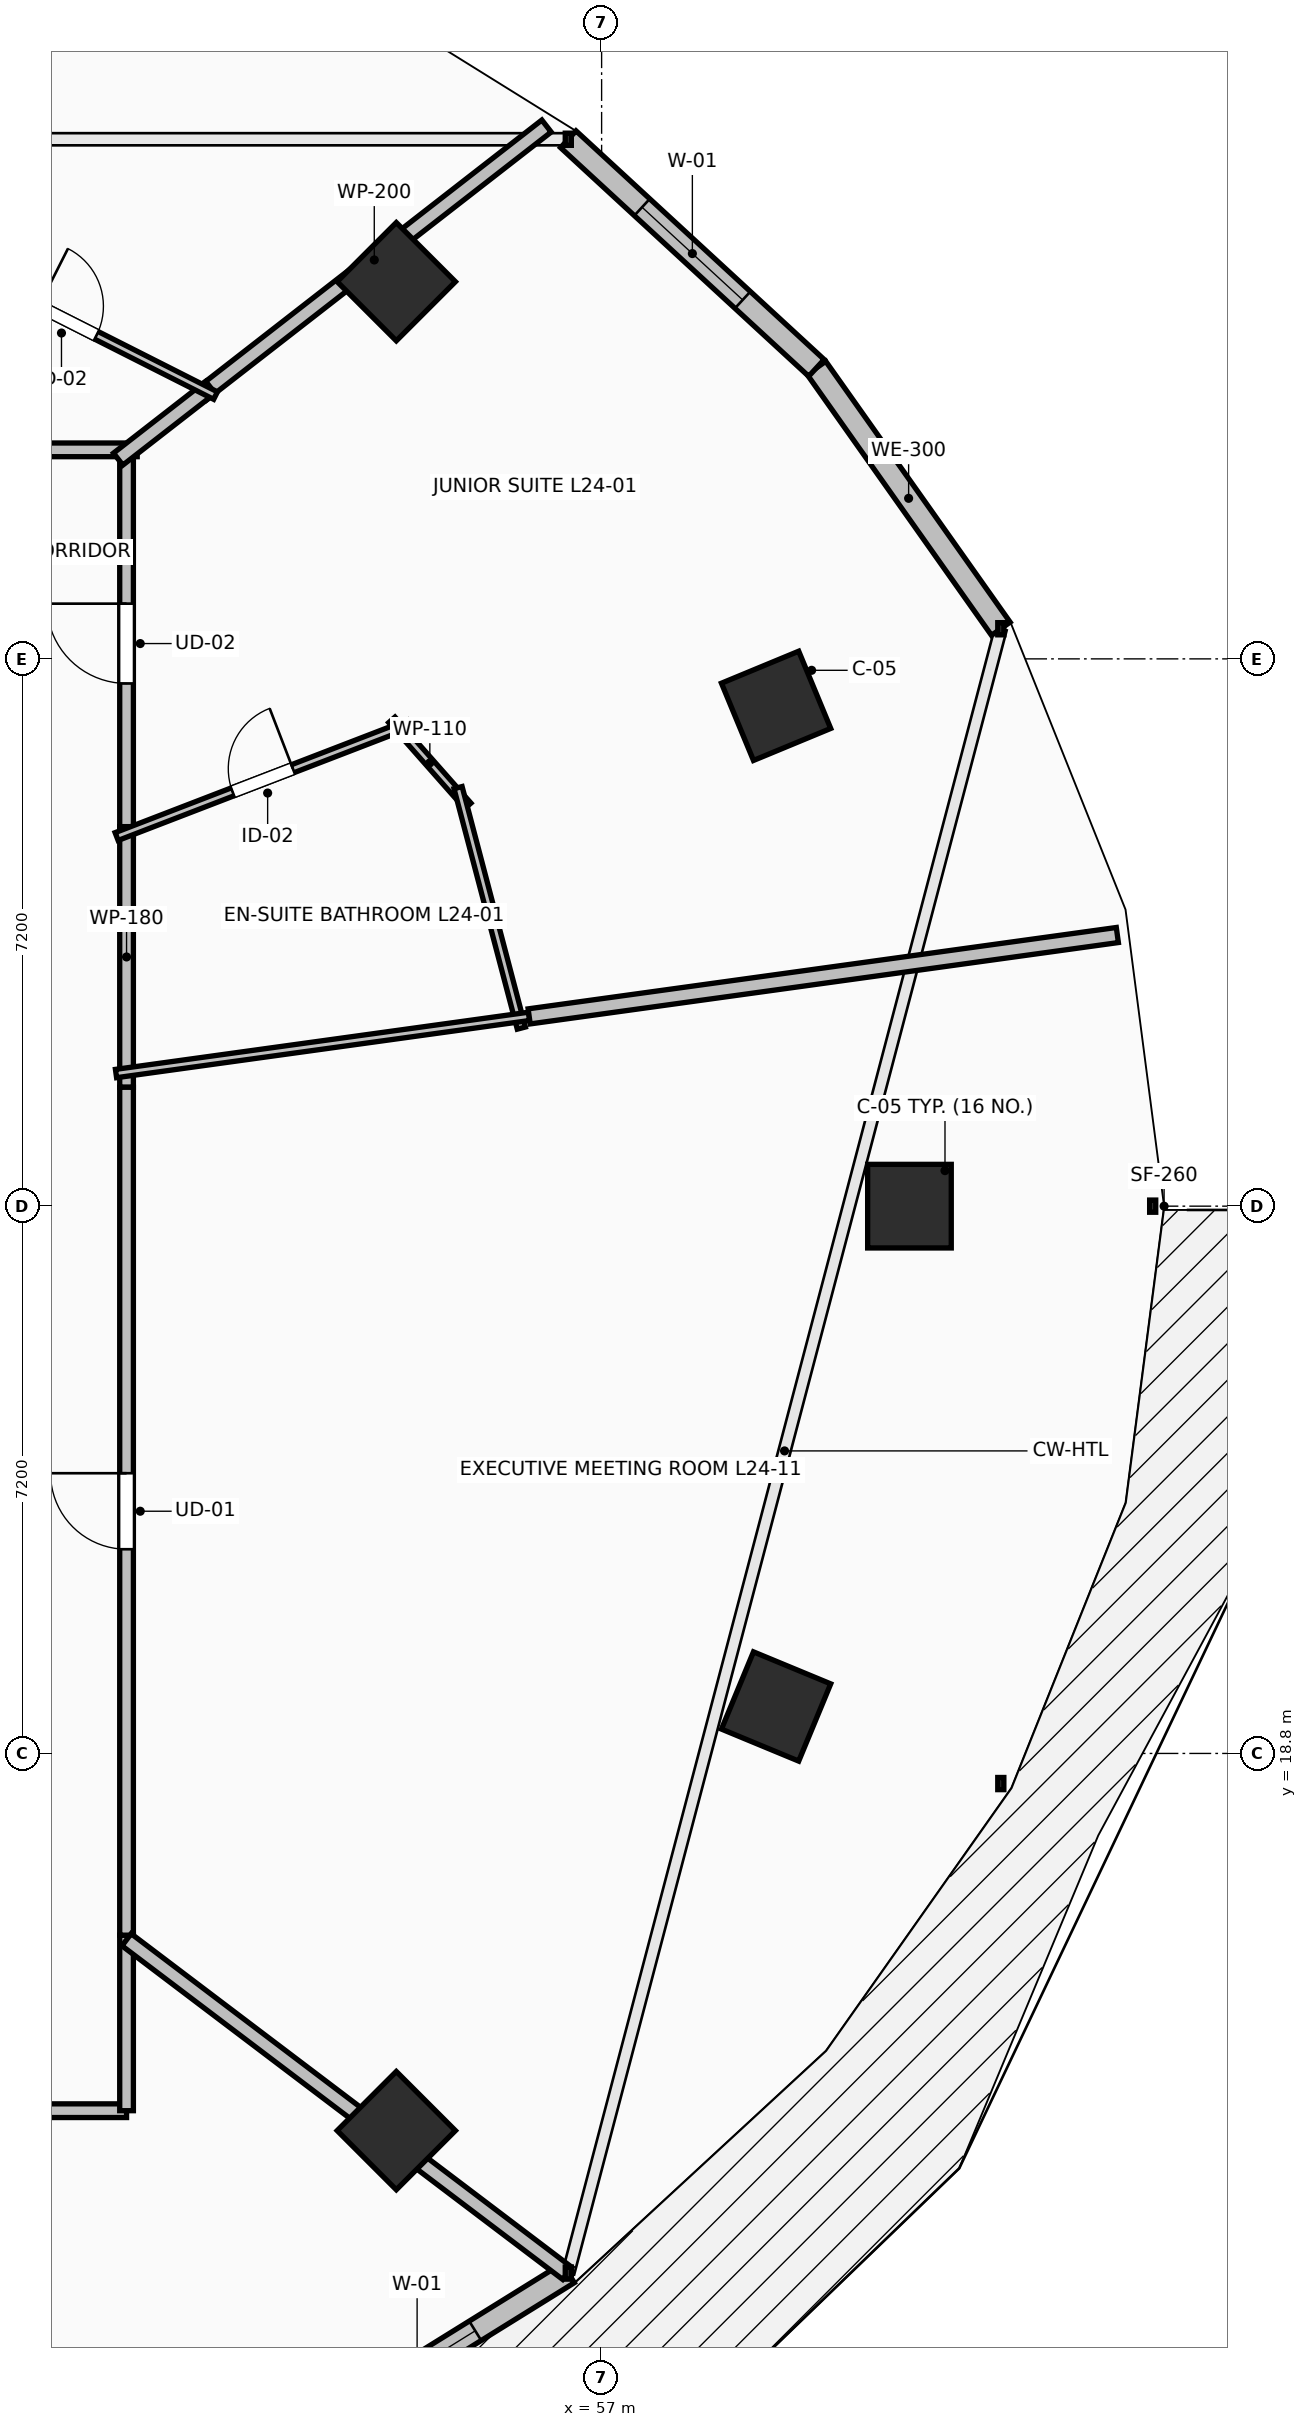
"""IFC4 building model, lengths in metres.
Left out: names, types, materials, properties, quantities, classifications, styles, units other than length and angle.
Written with IfcOpenShell. Run it as: python <this file> out.ifc"""

import sys

from ifc_helpers import new_model, si_unit, direction, frame, frame_2d, origin, origin_2d, place, context, subcontext, project, spatial, rectangle, extrude, element, fill, save


model = new_model("IFC4")
c1 = context("Model", 3, precision=1e-05, world=origin(), true_north=direction((0.0, 1.0)))
c2 = subcontext(c1, "Body", "Model", "MODEL_VIEW")
j1 = project(units=[si_unit("LENGTHUNIT", "METRE"), si_unit("PLANEANGLEUNIT", "RADIAN")], contexts=[c1])
p1 = place(None, origin())
s1 = spatial("IfcSite", under=j1, at=p1, CompositionType="ELEMENT")
p2 = place(p1, origin())
s2 = spatial("IfcBuilding", under=s1, at=p2, CompositionType="ELEMENT")
p3 = place(p2, frame((0.0, 0.0, 92.8)))
s3 = spatial("IfcBuildingStorey", under=s2, at=p3, CompositionType="ELEMENT", Elevation=92.8)
for number, where, z_axis, x_axis in (
    (1, (61.05, 26.0, 0.0), (0.0, 0.0, 1.0), (1.0, 0.0, 0.0)),
    (2, (59.295, 32.582, 0.0), (0.0, 0.0, 1.0), (0.924, 0.383, 0.0)),
    (3, (54.299, 38.162, 0.0), (0.0, 0.0, 1.0), (0.707, 0.707, 0.0)),
    (4, (54.299, 13.838, 0.0), (0.0, 0.0, 1.0), (0.707, -0.707, 0.0)),
    (5, (59.295, 19.418, 0.0), (0.0, 0.0, 1.0), (0.924, -0.383, 0.0)),
):
    element("IfcColumn", number, at=place(p3, frame(where, z_axis=z_axis, x_axis=x_axis)), inside=s3, PredefinedType="COLUMN", context=c2, shape_type="SweptSolid", body=[
        extrude(rectangle(XDim=1.1, YDim=1.1, at=origin_2d()), origin(), (0.0, 0.0, 1.0), 3.5),
    ])
p4 = place(p3, frame((62.252, 33.596, 0.0), z_axis=(0.0, 0.0, 1.0), x_axis=(-0.57716435238, 0.81662801222, 0.0)))
e6 = element("IfcWall", 6, at=p4, inside=s3, PredefinedType="STANDARD", context=c2, shape_type="SweptSolid", body=[
    extrude(rectangle(XDim=4.202, YDim=0.3, at=frame_2d((2.101, 0.0))), origin(), (0.0, 0.0, 1.0), 3.24),
])
p5 = place(p3, frame((59.826, 37.028, 0.0), z_axis=(0.0, 0.0, 1.0), x_axis=(-0.735416718093, 0.677615119924, 0.0)))
e7 = element("IfcWall", 7, at=p5, inside=s3, PredefinedType="STANDARD", context=c2, shape_type="SweptSolid", body=[
    extrude(rectangle(XDim=4.439, YDim=0.3, at=frame_2d((2.22, 0.0))), origin(), (0.0, 0.0, 1.0), 3.24),
])
p6 = place(p5, frame((1.32, 0.0, 0.85)))
e8 = element("IfcOpeningElement", 8, at=p6, cuts=e7, PredefinedType="OPENING", context=c2, shape_type="SweptSolid", body=[
    extrude(rectangle(XDim=1.8, YDim=2.19, at=frame_2d((0.9, 1.095))), frame((0.0, 0.165, 0.0), z_axis=(0.0, -1.0, 0.0), x_axis=(1.0, 0.0, 0.0)), (0.0, 0.0, 1.0), 0.33),
])
p7 = place(p3, frame((52.584, 9.495, 0.0), z_axis=(0.0, 0.0, 1.0), x_axis=(0.849684479743, 0.527291461038, 0.0)))
e9 = element("IfcWall", 9, at=p7, inside=s3, PredefinedType="STANDARD", context=c2, shape_type="SweptSolid", body=[
    extrude(rectangle(XDim=4.681, YDim=0.3, at=frame_2d((2.341, 0.0))), origin(), (0.0, 0.0, 1.0), 3.24),
])
p8 = place(p7, frame((1.441, 0.0, 0.85)))
e10 = element("IfcOpeningElement", 10, at=p8, cuts=e9, PredefinedType="OPENING", context=c2, shape_type="SweptSolid", body=[
    extrude(rectangle(XDim=1.8, YDim=2.19, at=frame_2d((0.9, 1.095))), frame((0.0, 0.165, 0.0), z_axis=(0.0, -1.0, 0.0), x_axis=(1.0, 0.0, 0.0)), (0.0, 0.0, 1.0), 0.33),
])
p9 = place(p3, frame((50.75, 30.853, 0.0), z_axis=(0.0, 0.0, 1.0), x_axis=(0.0, 1.0, 0.0)))
e11 = element("IfcWall", 11, at=p9, inside=s3, PredefinedType="PARTITIONING", context=c2, shape_type="SweptSolid", body=[
    extrude(rectangle(XDim=5.097, YDim=0.18, at=frame_2d((2.548, 0.0))), origin(), (0.0, 0.0, 1.0), 2.432),
])
p10 = place(p9, frame((2.023, 0.0, 0.0)))
e12 = element("IfcOpeningElement", 12, at=p10, cuts=e11, PredefinedType="OPENING", context=c2, shape_type="SweptSolid", body=[
    extrude(rectangle(XDim=1.05, YDim=2.2, at=frame_2d((0.525, 1.1))), frame((0.0, 0.105, 0.0), z_axis=(0.0, -1.0, 0.0), x_axis=(1.0, 0.0, 0.0)), (0.0, 0.0, 1.0), 0.21),
])
p11 = place(p3, frame((50.75, 27.564, 0.0), z_axis=(0.0, 0.0, 1.0), x_axis=(0.0, 1.0, 0.0)))
e13 = element("IfcWall", 13, at=p11, inside=s3, PredefinedType="PARTITIONING", context=c2, shape_type="SweptSolid", body=[
    extrude(rectangle(XDim=3.429, YDim=0.18, at=frame_2d((1.714, 0.0))), origin(), (0.0, 0.0, 1.0), 2.432),
])
p12 = place(p3, frame((50.89, 35.95, 0.0), z_axis=(0.0, 0.0, 1.0), x_axis=(-1.0, 0.0, 0.0)))
e14 = element("IfcWall", 14, at=p12, inside=s3, PredefinedType="PARTITIONING", context=c2, shape_type="SweptSolid", body=[
    extrude(rectangle(XDim=4.914, YDim=0.18, at=frame_2d((2.457, 0.0))), origin(), (0.0, 0.0, 1.0), 2.432),
])
p13 = place(p3, frame((44.181, 14.1, 0.0), z_axis=(0.0, 0.0, 1.0), x_axis=(1.0, 0.0, 0.0)))
e15 = element("IfcWall", 15, at=p13, inside=s3, PredefinedType="PARTITIONING", context=c2, shape_type="SweptSolid", body=[
    extrude(rectangle(XDim=6.569, YDim=0.18, at=frame_2d((3.285, 0.0))), origin(), (0.0, 0.0, 1.0), 2.432),
])
p14 = place(p13, frame((2.76, 0.0, 0.0)))
e16 = element("IfcOpeningElement", 16, at=p14, cuts=e15, PredefinedType="OPENING", context=c2, shape_type="SweptSolid", body=[
    extrude(rectangle(XDim=1.05, YDim=2.2, at=frame_2d((0.525, 1.1))), frame((0.0, 0.105, 0.0), z_axis=(0.0, -1.0, 0.0), x_axis=(1.0, 0.0, 0.0)), (0.0, 0.0, 1.0), 0.21),
])
p15 = place(p3, frame((50.75, 14.1, 0.0), z_axis=(0.0, 0.0, 1.0), x_axis=(0.0, 1.0, 0.0)))
e17 = element("IfcWall", 17, at=p15, inside=s3, PredefinedType="PARTITIONING", context=c2, shape_type="SweptSolid", body=[
    extrude(rectangle(XDim=2.309, YDim=0.18, at=frame_2d((1.154, 0.0))), origin(), (0.0, 0.0, 1.0), 2.432),
])
p16 = place(p3, frame((50.75, 16.409, 0.0), z_axis=(0.0, 0.0, 1.0), x_axis=(0.0, 1.0, 0.0)))
e18 = element("IfcWall", 18, at=p16, inside=s3, PredefinedType="PARTITIONING", context=c2, shape_type="SweptSolid", body=[
    extrude(rectangle(XDim=11.155, YDim=0.18, at=frame_2d((5.578, 0.0))), origin(), (0.0, 0.0, 1.0), 2.432),
])
p17 = place(p16, frame((5.077, 0.0, 0.0)))
e19 = element("IfcOpeningElement", 19, at=p17, cuts=e18, PredefinedType="OPENING", context=c2, shape_type="SweptSolid", body=[
    extrude(rectangle(XDim=1.0, YDim=2.15, at=frame_2d((0.5, 1.075))), frame((0.0, 0.105, 0.0), z_axis=(0.0, -1.0, 0.0), x_axis=(1.0, 0.0, 0.0)), (0.0, 0.0, 1.0), 0.21),
])
p18 = place(p3, frame((54.24, 32.398, 0.0), z_axis=(0.0, 0.0, 1.0), x_axis=(0.661931735756, -0.749564124808, 0.0)))
e20 = element("IfcWall", 20, at=p18, inside=s3, PredefinedType="PARTITIONING", context=c2, shape_type="SweptSolid", body=[
    extrude(rectangle(XDim=1.51, YDim=0.11, at=frame_2d((0.755, 0.0))), origin(), (0.0, 0.0, 1.0), 3.24),
])
p19 = place(p3, frame((55.111, 31.506, 0.0), z_axis=(0.0, 0.0, 1.0), x_axis=(0.254405137241, -0.967097733502, 0.0)))
e21 = element("IfcWall", 21, at=p19, inside=s3, PredefinedType="PARTITIONING", context=c2, shape_type="SweptSolid", body=[
    extrude(rectangle(XDim=3.271, YDim=0.11, at=frame_2d((1.636, 0.0))), origin(), (0.0, 0.0, 1.0), 2.922),
])
p20 = place(p3, frame((56.047, 28.497, 0.0), z_axis=(0.0, 0.0, 1.0), x_axis=(-0.990553307294, -0.137128207927, 0.0)))
e22 = element("IfcWall", 22, at=p20, inside=s3, PredefinedType="PARTITIONING", context=c2, shape_type="SweptSolid", body=[
    extrude(rectangle(XDim=5.487, YDim=0.11, at=frame_2d((2.744, 0.0))), origin(), (0.0, 0.0, 1.0), 2.432),
])
p21 = place(p3, frame((50.619, 30.863, 0.0), z_axis=(0.0, 0.0, 1.0), x_axis=(0.933189718051, 0.359384126144, 0.0)))
e23 = element("IfcWall", 23, at=p21, inside=s3, PredefinedType="PARTITIONING", context=c2, shape_type="SweptSolid", body=[
    extrude(rectangle(XDim=4.119, YDim=0.11, at=frame_2d((2.06, 0.0))), origin(), (0.0, 0.0, 1.0), 2.972),
])
p22 = place(p21, frame((1.635, 0.0, 0.0)))
e24 = element("IfcOpeningElement", 24, at=p22, cuts=e23, PredefinedType="OPENING", context=c2, shape_type="SweptSolid", body=[
    extrude(rectangle(XDim=0.85, YDim=2.1, at=frame_2d((0.425, 1.05))), frame((0.0, 0.07, 0.0), z_axis=(0.0, -1.0, 0.0), x_axis=(1.0, 0.0, 0.0)), (0.0, 0.0, 1.0), 0.14),
])
p23 = place(p3, frame((56.275, 40.21, 0.0), z_axis=(0.0, 0.0, 1.0), x_axis=(-0.78943235806, -0.613837561614, 0.0)))
e25 = element("IfcWall", 25, at=p23, inside=s3, PredefinedType="PARTITIONING", context=c2, shape_type="SweptSolid", body=[
    extrude(rectangle(XDim=5.741, YDim=0.2, at=frame_2d((2.87, 0.0))), origin(), (0.0, 0.0, 1.0), 2.677),
])
p24 = place(p3, frame((51.854, 36.772, 0.0), z_axis=(0.0, 0.0, 1.0), x_axis=(-0.789420593357, -0.613852691436, 0.0)))
e26 = element("IfcWall", 26, at=p24, inside=s3, PredefinedType="PARTITIONING", context=c2, shape_type="SweptSolid", body=[
    extrude(rectangle(XDim=1.538, YDim=0.2, at=frame_2d((0.769, 0.0))), origin(), (0.0, 0.0, 1.0), 2.922),
])
p25 = place(p3, frame((56.047, 28.497, 0.0), z_axis=(0.0, 0.0, 1.0), x_axis=(0.990569127114, 0.137013883997, 0.0)))
e27 = element("IfcWall", 27, at=p25, inside=s3, PredefinedType="PARTITIONING", context=c2, shape_type="SweptSolid", body=[
    extrude(rectangle(XDim=7.812, YDim=0.2, at=frame_2d((3.906, 0.0))), origin(), (0.0, 0.0, 1.0), 2.677),
])
p26 = place(p3, frame((48.029, 38.631, 0.0), z_axis=(0.0, 0.0, 1.0), x_axis=(0.892459125519, -0.451128262558, 0.0)))
e28 = element("IfcWall", 28, at=p26, inside=s3, PredefinedType="PARTITIONING", context=c2, shape_type="SweptSolid", body=[
    extrude(rectangle(XDim=4.361, YDim=0.11, at=frame_2d((2.18, 0.0))), origin(), (0.0, 0.0, 1.0), 3.24),
])
p27 = place(p26, frame((1.755, 0.0, 0.0)))
e29 = element("IfcOpeningElement", 29, at=p27, cuts=e28, PredefinedType="OPENING", context=c2, shape_type="SweptSolid", body=[
    extrude(rectangle(XDim=0.85, YDim=2.1, at=frame_2d((0.425, 1.05))), frame((0.0, 0.07, 0.0), z_axis=(0.0, -1.0, 0.0), x_axis=(1.0, 0.0, 0.0)), (0.0, 0.0, 1.0), 0.14),
])
p28 = place(p3, frame((56.548, 11.96, 0.0), z_axis=(0.0, 0.0, 1.0), x_axis=(-0.797312940684, 0.603566131105, 0.0)))
e30 = element("IfcWall", 30, at=p28, inside=s3, PredefinedType="PARTITIONING", context=c2, shape_type="SweptSolid", body=[
    extrude(rectangle(XDim=7.272, YDim=0.2, at=frame_2d((3.636, 0.0))), origin(), (0.0, 0.0, 1.0), 2.432),
])
p29 = place(p6, origin())
e31 = element("IfcWindow", 31, at=p29, inside=s3, PartitioningType="SINGLE_PANEL", PredefinedType="WINDOW", context=c2, shape_type="SweptSolid", body=[
    extrude(rectangle(XDim=1.8, YDim=2.19, at=frame_2d((0.9, 1.095))), frame((0.0, 0.03, 0.0), z_axis=(0.0, -1.0, 0.0), x_axis=(1.0, 0.0, 0.0)), (0.0, 0.0, 1.0), 0.06),
])
fill(e8, e31)
p30 = place(p8, origin())
e32 = element("IfcWindow", 32, at=p30, inside=s3, PartitioningType="SINGLE_PANEL", PredefinedType="WINDOW", context=c2, shape_type="SweptSolid", body=[
    extrude(rectangle(XDim=1.8, YDim=2.19, at=frame_2d((0.9, 1.095))), frame((0.0, 0.03, 0.0), z_axis=(0.0, -1.0, 0.0), x_axis=(1.0, 0.0, 0.0)), (0.0, 0.0, 1.0), 0.06),
])
fill(e10, e32)
p31 = place(p10, origin())
e33 = element("IfcDoor", 33, at=p31, inside=s3, OperationType="SINGLE_SWING_RIGHT", PredefinedType="DOOR", context=c2, shape_type="SweptSolid", body=[
    extrude(rectangle(XDim=1.05, YDim=2.2, at=frame_2d((0.525, 1.1))), frame((0.0, 0.025, 0.0), z_axis=(0.0, -1.0, 0.0), x_axis=(1.0, 0.0, 0.0)), (0.0, 0.0, 1.0), 0.05),
])
fill(e12, e33)
p32 = place(p17, origin())
e34 = element("IfcDoor", 34, at=p32, inside=s3, OperationType="SINGLE_SWING_RIGHT", PredefinedType="DOOR", context=c2, shape_type="SweptSolid", body=[
    extrude(rectangle(XDim=1.0, YDim=2.15, at=frame_2d((0.5, 1.075))), frame((0.0, 0.025, 0.0), z_axis=(0.0, -1.0, 0.0), x_axis=(1.0, 0.0, 0.0)), (0.0, 0.0, 1.0), 0.05),
])
fill(e19, e34)
p33 = place(p22, origin())
e35 = element("IfcDoor", 35, at=p33, inside=s3, OperationType="SINGLE_SWING_RIGHT", PredefinedType="DOOR", context=c2, shape_type="SweptSolid", body=[
    extrude(rectangle(XDim=0.85, YDim=2.1, at=frame_2d((0.425, 1.05))), frame((0.0, 0.025, 0.0), z_axis=(0.0, -1.0, 0.0), x_axis=(1.0, 0.0, 0.0)), (0.0, 0.0, 1.0), 0.05),
])
fill(e24, e35)
p34 = place(p27, origin())
e36 = element("IfcDoor", 36, at=p34, inside=s3, OperationType="SINGLE_SWING_LEFT", PredefinedType="DOOR", context=c2, shape_type="SweptSolid", body=[
    extrude(rectangle(XDim=0.85, YDim=2.1, at=frame_2d((0.425, 1.05))), frame((0.0, 0.025, 0.0), z_axis=(0.0, -1.0, 0.0), x_axis=(1.0, 0.0, 0.0)), (0.0, 0.0, 1.0), 0.05),
])
fill(e29, e36)
save(model, sys.argv[1])
